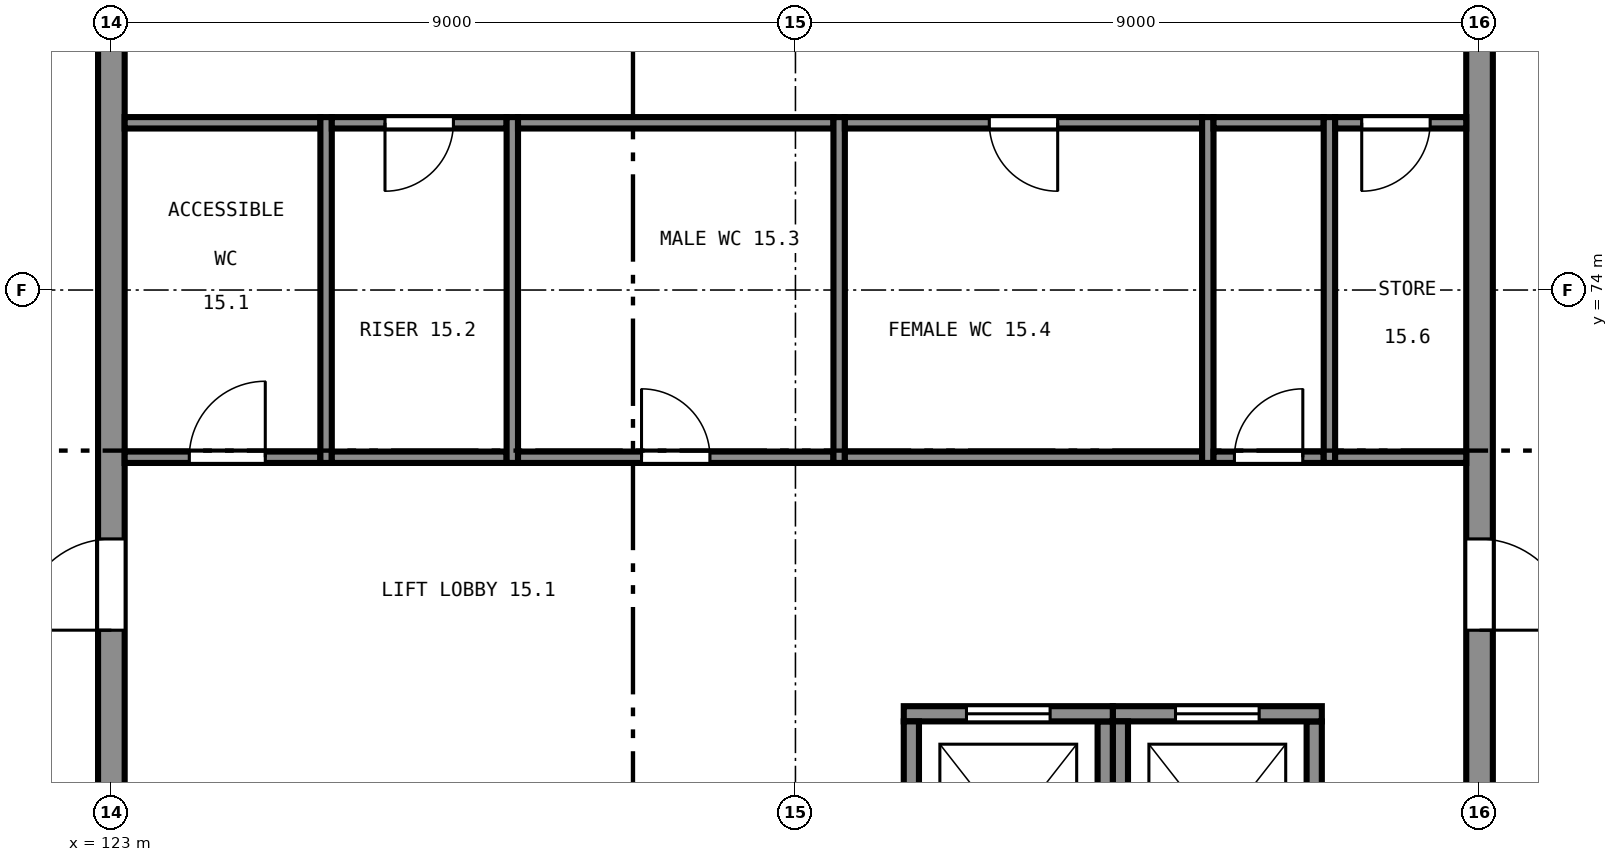
"""IFC4 building model, lengths in metres.
Left out: names, types, materials, properties, quantities, classifications, styles, units other than length and angle.
Written with IfcOpenShell. Run it as: python <this file> out.ifc"""

import sys

from ifc_helpers import new_model, si_unit, direction, frame, frame_2d, origin, place, context, subcontext, project, spatial, rectangle, extrude, element, fill, save


model = new_model("IFC4")
c1 = context("Model", 3, precision=1e-05, world=origin(), true_north=direction((0.0, 1.0)))
c2 = subcontext(c1, "Body", "Model", "MODEL_VIEW")
j1 = project(units=[si_unit("LENGTHUNIT", "METRE"), si_unit("PLANEANGLEUNIT", "RADIAN")], contexts=[c1])
p1 = place(None, origin())
s1 = spatial("IfcSite", under=j1, at=p1, CompositionType="ELEMENT")
p2 = place(p1, origin())
s2 = spatial("IfcBuilding", under=s1, at=p2, CompositionType="ELEMENT")
p3 = place(p2, frame((0.0, 0.0, 61.5)))
s3 = spatial("IfcBuildingStorey", under=s2, at=p3, CompositionType="ELEMENT", Elevation=61.5)
p4 = place(p3, frame((141.0, 65.175, 0.0), z_axis=(0.0, 0.0, 1.0), x_axis=(0.0, 1.0, 0.0)))
e1 = element("IfcWall", 1, at=p4, inside=s3, PredefinedType="SHEAR", context=c2, shape_type="SweptSolid", body=[
    extrude(rectangle(XDim=17.65, YDim=0.35, at=frame_2d((8.825, 0.0))), origin(), (0.0, 0.0, 1.0), 4.0),
])
p5 = place(p4, frame((4.35, 0.0, 0.0)))
e2 = element("IfcOpeningElement", 2, at=p5, cuts=e1, PredefinedType="OPENING", context=c2, shape_type="SweptSolid", body=[
    extrude(rectangle(XDim=1.2, YDim=2.1, at=frame_2d((0.6, 1.05))), frame((0.0, 0.185, 0.0), z_axis=(0.0, -1.0, 0.0), x_axis=(1.0, 0.0, 0.0)), (0.0, 0.0, 1.0), 0.37),
])
p6 = place(p4, frame((12.1, 0.0, 0.0)))
e3 = element("IfcOpeningElement", 3, at=p6, cuts=e1, PredefinedType="OPENING", context=c2, shape_type="SweptSolid", body=[
    extrude(rectangle(XDim=1.2, YDim=2.1, at=frame_2d((0.6, 1.05))), frame((0.0, 0.185, 0.0), z_axis=(0.0, -1.0, 0.0), x_axis=(1.0, 0.0, 0.0)), (0.0, 0.0, 1.0), 0.37),
])
p7 = place(p3, frame((123.0, 82.825, 0.0), z_axis=(0.0, 0.0, 1.0), x_axis=(0.0, -1.0, 0.0)))
e4 = element("IfcWall", 4, at=p7, inside=s3, PredefinedType="SHEAR", context=c2, shape_type="SweptSolid", body=[
    extrude(rectangle(XDim=17.65, YDim=0.35, at=frame_2d((8.825, 0.0))), origin(), (0.0, 0.0, 1.0), 4.0),
])
p8 = place(p7, frame((12.1, 0.0, 0.0)))
e5 = element("IfcOpeningElement", 5, at=p8, cuts=e4, PredefinedType="OPENING", context=c2, shape_type="SweptSolid", body=[
    extrude(rectangle(XDim=1.2, YDim=2.1, at=frame_2d((0.6, 1.05))), frame((0.0, 0.185, 0.0), z_axis=(0.0, -1.0, 0.0), x_axis=(1.0, 0.0, 0.0)), (0.0, 0.0, 1.0), 0.37),
])
p9 = place(p7, frame((4.35, 0.0, 0.0)))
e6 = element("IfcOpeningElement", 6, at=p9, cuts=e4, PredefinedType="OPENING", context=c2, shape_type="SweptSolid", body=[
    extrude(rectangle(XDim=1.2, YDim=2.1, at=frame_2d((0.6, 1.05))), frame((0.0, 0.185, 0.0), z_axis=(0.0, -1.0, 0.0), x_axis=(1.0, 0.0, 0.0)), (0.0, 0.0, 1.0), 0.37),
])
p10 = place(p3, frame((136.075, 65.425, 0.0), z_axis=(0.0, 0.0, 1.0), x_axis=(0.0, 1.0, 0.0)))
e7 = element("IfcWall", 7, at=p10, inside=s3, PredefinedType="SHEAR", context=c2, shape_type="SweptSolid", body=[
    extrude(rectangle(XDim=2.9, YDim=0.2, at=frame_2d((1.45, 0.0))), origin(), (0.0, 0.0, 1.0), 4.0),
])
p11 = place(p3, frame((136.175, 68.425, 0.0), z_axis=(0.0, 0.0, 1.0), x_axis=(-1.0, 0.0, 0.0)))
e8 = element("IfcWall", 8, at=p11, inside=s3, PredefinedType="SHEAR", context=c2, shape_type="SweptSolid", body=[
    extrude(rectangle(XDim=2.75, YDim=0.2, at=frame_2d((1.375, 0.0))), origin(), (0.0, 0.0, 1.0), 4.0),
])
p12 = place(p11, frame((0.825, 0.0, 0.0)))
e9 = element("IfcOpeningElement", 9, at=p12, cuts=e8, PredefinedType="OPENING", context=c2, shape_type="SweptSolid", body=[
    extrude(rectangle(XDim=1.1, YDim=2.1, at=frame_2d((0.55, 1.05))), frame((0.0, 0.11, 0.0), z_axis=(0.0, -1.0, 0.0), x_axis=(1.0, 0.0, 0.0)), (0.0, 0.0, 1.0), 0.22),
])
for number, where, z_axis, x_axis in (
    (10, (133.525, 68.325, 0.0), (0.0, 0.0, 1.0), (0.0, -1.0, 0.0)),
    (11, (138.825, 65.425, 0.0), (0.0, 0.0, 1.0), (0.0, 1.0, 0.0)),
):
    element("IfcWall", number, at=place(p3, frame(where, z_axis=z_axis, x_axis=x_axis)), inside=s3, PredefinedType="SHEAR", context=c2, shape_type="SweptSolid", body=[
        extrude(rectangle(XDim=2.9, YDim=0.2, at=frame_2d((1.45, 0.0))), origin(), (0.0, 0.0, 1.0), 4.0),
    ])
p13 = place(p3, frame((138.925, 68.425, 0.0), z_axis=(0.0, 0.0, 1.0), x_axis=(-1.0, 0.0, 0.0)))
e12 = element("IfcWall", 12, at=p13, inside=s3, PredefinedType="SHEAR", context=c2, shape_type="SweptSolid", body=[
    extrude(rectangle(XDim=2.75, YDim=0.2, at=frame_2d((1.375, 0.0))), origin(), (0.0, 0.0, 1.0), 4.0),
])
p14 = place(p13, frame((0.825, 0.0, 0.0)))
e13 = element("IfcOpeningElement", 13, at=p14, cuts=e12, PredefinedType="OPENING", context=c2, shape_type="SweptSolid", body=[
    extrude(rectangle(XDim=1.1, YDim=2.1, at=frame_2d((0.55, 1.05))), frame((0.0, 0.11, 0.0), z_axis=(0.0, -1.0, 0.0), x_axis=(1.0, 0.0, 0.0)), (0.0, 0.0, 1.0), 0.22),
])
p15 = place(p3, frame((136.275, 68.325, 0.0), z_axis=(0.0, 0.0, 1.0), x_axis=(0.0, -1.0, 0.0)))
e14 = element("IfcWall", 14, at=p15, inside=s3, PredefinedType="SHEAR", context=c2, shape_type="SweptSolid", body=[
    extrude(rectangle(XDim=2.9, YDim=0.2, at=frame_2d((1.45, 0.0))), origin(), (0.0, 0.0, 1.0), 4.0),
])
p16 = place(p3, frame((125.825, 71.725, 0.0), z_axis=(0.0, 0.0, 1.0), x_axis=(0.0, 1.0, 0.0)))
e15 = element("IfcWall", 15, at=p16, inside=s3, PredefinedType="PARTITIONING", context=c2, shape_type="SweptSolid", body=[
    extrude(rectangle(XDim=4.55, YDim=0.15, at=frame_2d((2.275, 0.0))), origin(), (0.0, 0.0, 1.0), 3.58),
])
p17 = place(p3, frame((123.175, 71.8, 0.0), z_axis=(0.0, 0.0, 1.0), x_axis=(1.0, 0.0, 0.0)))
e16 = element("IfcWall", 16, at=p17, inside=s3, PredefinedType="PARTITIONING", context=c2, shape_type="SweptSolid", body=[
    extrude(rectangle(XDim=2.575, YDim=0.15, at=frame_2d((1.288, 0.0))), origin(), (0.0, 0.0, 1.0), 3.58),
])
p18 = place(p17, frame((0.85, 0.0, 0.0)))
e17 = element("IfcOpeningElement", 17, at=p18, cuts=e16, PredefinedType="OPENING", context=c2, shape_type="SweptSolid", body=[
    extrude(rectangle(XDim=1.0, YDim=2.1, at=frame_2d((0.5, 1.05))), frame((0.0, 0.085, 0.0), z_axis=(0.0, -1.0, 0.0), x_axis=(1.0, 0.0, 0.0)), (0.0, 0.0, 1.0), 0.17),
])
p19 = place(p3, frame((123.175, 76.2, 0.0), z_axis=(0.0, 0.0, 1.0), x_axis=(1.0, 0.0, 0.0)))
e18 = element("IfcWall", 18, at=p19, inside=s3, PredefinedType="PARTITIONING", context=c2, shape_type="SweptSolid", body=[
    extrude(rectangle(XDim=2.575, YDim=0.15, at=frame_2d((1.288, 0.0))), origin(), (0.0, 0.0, 1.0), 3.58),
])
p20 = place(p3, frame((128.275, 71.725, 0.0), z_axis=(0.0, 0.0, 1.0), x_axis=(0.0, 1.0, 0.0)))
e19 = element("IfcWall", 19, at=p20, inside=s3, PredefinedType="PARTITIONING", context=c2, shape_type="SweptSolid", body=[
    extrude(rectangle(XDim=4.55, YDim=0.15, at=frame_2d((2.275, 0.0))), origin(), (0.0, 0.0, 1.0), 3.58),
])
p21 = place(p3, frame((125.9, 71.8, 0.0), z_axis=(0.0, 0.0, 1.0), x_axis=(1.0, 0.0, 0.0)))
e20 = element("IfcWall", 20, at=p21, inside=s3, PredefinedType="PARTITIONING", context=c2, shape_type="SweptSolid", body=[
    extrude(rectangle(XDim=2.3, YDim=0.15, at=frame_2d((1.15, 0.0))), origin(), (0.0, 0.0, 1.0), 3.58),
])
p22 = place(p3, frame((125.9, 76.2, 0.0), z_axis=(0.0, 0.0, 1.0), x_axis=(1.0, 0.0, 0.0)))
e21 = element("IfcWall", 21, at=p22, inside=s3, PredefinedType="PARTITIONING", context=c2, shape_type="SweptSolid", body=[
    extrude(rectangle(XDim=2.3, YDim=0.15, at=frame_2d((1.15, 0.0))), origin(), (0.0, 0.0, 1.0), 3.58),
])
p23 = place(p22, frame((0.7, 0.0, 0.0)))
e22 = element("IfcOpeningElement", 22, at=p23, cuts=e21, PredefinedType="OPENING", context=c2, shape_type="SweptSolid", body=[
    extrude(rectangle(XDim=0.9, YDim=2.1, at=frame_2d((0.45, 1.05))), frame((0.0, 0.085, 0.0), z_axis=(0.0, -1.0, 0.0), x_axis=(1.0, 0.0, 0.0)), (0.0, 0.0, 1.0), 0.17),
])
p24 = place(p3, frame((132.575, 71.725, 0.0), z_axis=(0.0, 0.0, 1.0), x_axis=(0.0, 1.0, 0.0)))
e23 = element("IfcWall", 23, at=p24, inside=s3, PredefinedType="PARTITIONING", context=c2, shape_type="SweptSolid", body=[
    extrude(rectangle(XDim=4.55, YDim=0.15, at=frame_2d((2.275, 0.0))), origin(), (0.0, 0.0, 1.0), 3.58),
])
p25 = place(p3, frame((128.35, 71.8, 0.0), z_axis=(0.0, 0.0, 1.0), x_axis=(1.0, 0.0, 0.0)))
e24 = element("IfcWall", 24, at=p25, inside=s3, PredefinedType="PARTITIONING", context=c2, shape_type="SweptSolid", body=[
    extrude(rectangle(XDim=4.15, YDim=0.15, at=frame_2d((2.075, 0.0))), origin(), (0.0, 0.0, 1.0), 3.58),
])
p26 = place(p25, frame((1.625, 0.0, 0.0)))
e25 = element("IfcOpeningElement", 25, at=p26, cuts=e24, PredefinedType="OPENING", context=c2, shape_type="SweptSolid", body=[
    extrude(rectangle(XDim=0.9, YDim=2.1, at=frame_2d((0.45, 1.05))), frame((0.0, 0.085, 0.0), z_axis=(0.0, -1.0, 0.0), x_axis=(1.0, 0.0, 0.0)), (0.0, 0.0, 1.0), 0.17),
])
p27 = place(p3, frame((128.35, 76.2, 0.0), z_axis=(0.0, 0.0, 1.0), x_axis=(1.0, 0.0, 0.0)))
e26 = element("IfcWall", 26, at=p27, inside=s3, PredefinedType="PARTITIONING", context=c2, shape_type="SweptSolid", body=[
    extrude(rectangle(XDim=4.15, YDim=0.15, at=frame_2d((2.075, 0.0))), origin(), (0.0, 0.0, 1.0), 3.58),
])
p28 = place(p3, frame((137.425, 71.725, 0.0), z_axis=(0.0, 0.0, 1.0), x_axis=(0.0, 1.0, 0.0)))
e27 = element("IfcWall", 27, at=p28, inside=s3, PredefinedType="PARTITIONING", context=c2, shape_type="SweptSolid", body=[
    extrude(rectangle(XDim=4.55, YDim=0.15, at=frame_2d((2.275, 0.0))), origin(), (0.0, 0.0, 1.0), 3.58),
])
p29 = place(p3, frame((132.65, 71.8, 0.0), z_axis=(0.0, 0.0, 1.0), x_axis=(1.0, 0.0, 0.0)))
e28 = element("IfcWall", 28, at=p29, inside=s3, PredefinedType="PARTITIONING", context=c2, shape_type="SweptSolid", body=[
    extrude(rectangle(XDim=4.7, YDim=0.15, at=frame_2d((2.35, 0.0))), origin(), (0.0, 0.0, 1.0), 3.58),
])
p30 = place(p3, frame((132.65, 76.2, 0.0), z_axis=(0.0, 0.0, 1.0), x_axis=(1.0, 0.0, 0.0)))
e29 = element("IfcWall", 29, at=p30, inside=s3, PredefinedType="PARTITIONING", context=c2, shape_type="SweptSolid", body=[
    extrude(rectangle(XDim=4.7, YDim=0.15, at=frame_2d((2.35, 0.0))), origin(), (0.0, 0.0, 1.0), 3.58),
])
p31 = place(p30, frame((1.9, 0.0, 0.0)))
e30 = element("IfcOpeningElement", 30, at=p31, cuts=e29, PredefinedType="OPENING", context=c2, shape_type="SweptSolid", body=[
    extrude(rectangle(XDim=0.9, YDim=2.1, at=frame_2d((0.45, 1.05))), frame((0.0, 0.085, 0.0), z_axis=(0.0, -1.0, 0.0), x_axis=(1.0, 0.0, 0.0)), (0.0, 0.0, 1.0), 0.17),
])
p32 = place(p3, frame((139.025, 71.725, 0.0), z_axis=(0.0, 0.0, 1.0), x_axis=(0.0, 1.0, 0.0)))
e31 = element("IfcWall", 31, at=p32, inside=s3, PredefinedType="PARTITIONING", context=c2, shape_type="SweptSolid", body=[
    extrude(rectangle(XDim=4.55, YDim=0.15, at=frame_2d((2.275, 0.0))), origin(), (0.0, 0.0, 1.0), 3.58),
])
p33 = place(p3, frame((137.5, 71.8, 0.0), z_axis=(0.0, 0.0, 1.0), x_axis=(1.0, 0.0, 0.0)))
e32 = element("IfcWall", 32, at=p33, inside=s3, PredefinedType="PARTITIONING", context=c2, shape_type="SweptSolid", body=[
    extrude(rectangle(XDim=1.45, YDim=0.15, at=frame_2d((0.725, 0.0))), origin(), (0.0, 0.0, 1.0), 3.58),
])
p34 = place(p33, frame((0.275, 0.0, 0.0)))
e33 = element("IfcOpeningElement", 33, at=p34, cuts=e32, PredefinedType="OPENING", context=c2, shape_type="SweptSolid", body=[
    extrude(rectangle(XDim=0.9, YDim=2.1, at=frame_2d((0.45, 1.05))), frame((0.0, 0.085, 0.0), z_axis=(0.0, -1.0, 0.0), x_axis=(1.0, 0.0, 0.0)), (0.0, 0.0, 1.0), 0.17),
])
p35 = place(p3, frame((137.5, 76.2, 0.0), z_axis=(0.0, 0.0, 1.0), x_axis=(1.0, 0.0, 0.0)))
e34 = element("IfcWall", 34, at=p35, inside=s3, PredefinedType="PARTITIONING", context=c2, shape_type="SweptSolid", body=[
    extrude(rectangle(XDim=1.45, YDim=0.15, at=frame_2d((0.725, 0.0))), origin(), (0.0, 0.0, 1.0), 3.58),
])
p36 = place(p3, frame((139.1, 71.8, 0.0), z_axis=(0.0, 0.0, 1.0), x_axis=(1.0, 0.0, 0.0)))
e35 = element("IfcWall", 35, at=p36, inside=s3, PredefinedType="PARTITIONING", context=c2, shape_type="SweptSolid", body=[
    extrude(rectangle(XDim=1.725, YDim=0.15, at=frame_2d((0.862, 0.0))), origin(), (0.0, 0.0, 1.0), 3.58),
])
p37 = place(p3, frame((139.1, 76.2, 0.0), z_axis=(0.0, 0.0, 1.0), x_axis=(1.0, 0.0, 0.0)))
e36 = element("IfcWall", 36, at=p37, inside=s3, PredefinedType="PARTITIONING", context=c2, shape_type="SweptSolid", body=[
    extrude(rectangle(XDim=1.725, YDim=0.15, at=frame_2d((0.862, 0.0))), origin(), (0.0, 0.0, 1.0), 3.58),
])
p38 = place(p37, frame((0.35, 0.0, 0.0)))
e37 = element("IfcOpeningElement", 37, at=p38, cuts=e36, PredefinedType="OPENING", context=c2, shape_type="SweptSolid", body=[
    extrude(rectangle(XDim=0.9, YDim=2.1, at=frame_2d((0.45, 1.05))), frame((0.0, 0.085, 0.0), z_axis=(0.0, -1.0, 0.0), x_axis=(1.0, 0.0, 0.0)), (0.0, 0.0, 1.0), 0.17),
])
p39 = place(p12, origin())
e38 = element("IfcDoor", 38, at=p39, inside=s3, OperationType="SLIDING_TO_LEFT", PredefinedType="DOOR", context=c2, shape_type="SweptSolid", body=[
    extrude(rectangle(XDim=1.1, YDim=2.1, at=frame_2d((0.55, 1.05))), frame((0.0, 0.025, 0.0), z_axis=(0.0, -1.0, 0.0), x_axis=(1.0, 0.0, 0.0)), (0.0, 0.0, 1.0), 0.05),
])
fill(e9, e38)
p40 = place(p14, origin())
e39 = element("IfcDoor", 39, at=p40, inside=s3, OperationType="SLIDING_TO_LEFT", PredefinedType="DOOR", context=c2, shape_type="SweptSolid", body=[
    extrude(rectangle(XDim=1.1, YDim=2.1, at=frame_2d((0.55, 1.05))), frame((0.0, 0.025, 0.0), z_axis=(0.0, -1.0, 0.0), x_axis=(1.0, 0.0, 0.0)), (0.0, 0.0, 1.0), 0.05),
])
fill(e13, e39)
p41 = place(p8, frame((1.2, 0.0, 0.0), z_axis=(0.0, 0.0, 1.0), x_axis=(-1.0, 0.0, 0.0)))
e40 = element("IfcDoor", 40, at=p41, inside=s3, OperationType="SINGLE_SWING_RIGHT", PredefinedType="DOOR", context=c2, shape_type="SweptSolid", body=[
    extrude(rectangle(XDim=1.2, YDim=2.1, at=frame_2d((0.6, 1.05))), frame((0.0, 0.025, 0.0), z_axis=(0.0, -1.0, 0.0), x_axis=(1.0, 0.0, 0.0)), (0.0, 0.0, 1.0), 0.05),
])
fill(e5, e40)
p42 = place(p5, frame((1.2, 0.0, 0.0), z_axis=(0.0, 0.0, 1.0), x_axis=(-1.0, 0.0, 0.0)))
e41 = element("IfcDoor", 41, at=p42, inside=s3, OperationType="SINGLE_SWING_LEFT", PredefinedType="DOOR", context=c2, shape_type="SweptSolid", body=[
    extrude(rectangle(XDim=1.2, YDim=2.1, at=frame_2d((0.6, 1.05))), frame((0.0, 0.025, 0.0), z_axis=(0.0, -1.0, 0.0), x_axis=(1.0, 0.0, 0.0)), (0.0, 0.0, 1.0), 0.05),
])
fill(e2, e41)
p43 = place(p18, origin())
e42 = element("IfcDoor", 42, at=p43, inside=s3, OperationType="SINGLE_SWING_LEFT", PredefinedType="DOOR", context=c2, shape_type="SweptSolid", body=[
    extrude(rectangle(XDim=1.0, YDim=2.1, at=frame_2d((0.5, 1.05))), frame((0.0, 0.025, 0.0), z_axis=(0.0, -1.0, 0.0), x_axis=(1.0, 0.0, 0.0)), (0.0, 0.0, 1.0), 0.05),
])
fill(e17, e42)
p44 = place(p23, frame((0.9, 0.0, 0.0), z_axis=(0.0, 0.0, 1.0), x_axis=(-1.0, 0.0, 0.0)))
e43 = element("IfcDoor", 43, at=p44, inside=s3, OperationType="SINGLE_SWING_LEFT", PredefinedType="DOOR", context=c2, shape_type="SweptSolid", body=[
    extrude(rectangle(XDim=0.9, YDim=2.1, at=frame_2d((0.45, 1.05))), frame((0.0, 0.025, 0.0), z_axis=(0.0, -1.0, 0.0), x_axis=(1.0, 0.0, 0.0)), (0.0, 0.0, 1.0), 0.05),
])
fill(e22, e43)
p45 = place(p26, origin())
e44 = element("IfcDoor", 44, at=p45, inside=s3, OperationType="SINGLE_SWING_RIGHT", PredefinedType="DOOR", context=c2, shape_type="SweptSolid", body=[
    extrude(rectangle(XDim=0.9, YDim=2.1, at=frame_2d((0.45, 1.05))), frame((0.0, 0.025, 0.0), z_axis=(0.0, -1.0, 0.0), x_axis=(1.0, 0.0, 0.0)), (0.0, 0.0, 1.0), 0.05),
])
fill(e25, e44)
p46 = place(p31, frame((0.9, 0.0, 0.0), z_axis=(0.0, 0.0, 1.0), x_axis=(-1.0, 0.0, 0.0)))
e45 = element("IfcDoor", 45, at=p46, inside=s3, OperationType="SINGLE_SWING_RIGHT", PredefinedType="DOOR", context=c2, shape_type="SweptSolid", body=[
    extrude(rectangle(XDim=0.9, YDim=2.1, at=frame_2d((0.45, 1.05))), frame((0.0, 0.025, 0.0), z_axis=(0.0, -1.0, 0.0), x_axis=(1.0, 0.0, 0.0)), (0.0, 0.0, 1.0), 0.05),
])
fill(e30, e45)
p47 = place(p34, origin())
e46 = element("IfcDoor", 46, at=p47, inside=s3, OperationType="SINGLE_SWING_LEFT", PredefinedType="DOOR", context=c2, shape_type="SweptSolid", body=[
    extrude(rectangle(XDim=0.9, YDim=2.1, at=frame_2d((0.45, 1.05))), frame((0.0, 0.025, 0.0), z_axis=(0.0, -1.0, 0.0), x_axis=(1.0, 0.0, 0.0)), (0.0, 0.0, 1.0), 0.05),
])
fill(e33, e46)
p48 = place(p38, frame((0.9, 0.0, 0.0), z_axis=(0.0, 0.0, 1.0), x_axis=(-1.0, 0.0, 0.0)))
e47 = element("IfcDoor", 47, at=p48, inside=s3, OperationType="SINGLE_SWING_LEFT", PredefinedType="DOOR", context=c2, shape_type="SweptSolid", body=[
    extrude(rectangle(XDim=0.9, YDim=2.1, at=frame_2d((0.45, 1.05))), frame((0.0, 0.025, 0.0), z_axis=(0.0, -1.0, 0.0), x_axis=(1.0, 0.0, 0.0)), (0.0, 0.0, 1.0), 0.05),
])
fill(e37, e47)
save(model, sys.argv[1])
